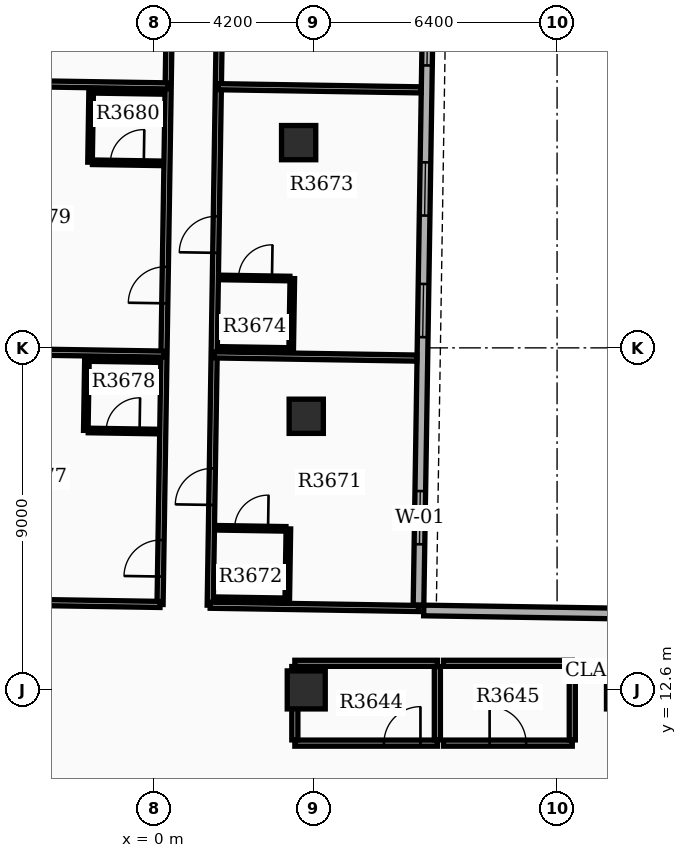
"""IFC4 building model, lengths in metres.
Left out: names, types, materials, properties, quantities, classifications, styles, units other than length and angle.
Written with IfcOpenShell. Run it as: python <this file> out.ifc"""

import sys

from ifc_helpers import new_model, si_unit, direction, frame, frame_2d, origin, origin_2d, place, context, subcontext, project, spatial, rectangle, extrude, element, fill, save


model = new_model("IFC4")
c1 = context("Model", 3, precision=1e-05, world=origin(), true_north=direction((0.0, 1.0)))
c2 = subcontext(c1, "Body", "Model", "MODEL_VIEW")
j1 = project(units=[si_unit("LENGTHUNIT", "METRE"), si_unit("PLANEANGLEUNIT", "RADIAN")], contexts=[c1])
p1 = place(None, origin())
s1 = spatial("IfcSite", under=j1, at=p1, CompositionType="ELEMENT")
p2 = place(p1, origin())
s2 = spatial("IfcBuilding", under=s1, at=p2, CompositionType="ELEMENT")
p3 = place(p2, frame((0.0, 0.0, 228.6)))
s3 = spatial("IfcBuildingStorey", under=s2, at=p3, CompositionType="ELEMENT", Elevation=228.6)
for number, where, z_axis, x_axis in (
    (1, (12.4, 12.6, 0.0), (0.0, 0.0, 1.0), (1.0, 0.0, 0.0)),
    (2, (4.0, 12.6, 0.0), (0.0, 0.0, 1.0), (1.0, 0.0, 0.0)),
):
    element("IfcColumn", number, at=place(p3, frame(where, z_axis=z_axis, x_axis=x_axis)), inside=s3, PredefinedType="COLUMN", context=c2, shape_type="SweptSolid", body=[
        extrude(rectangle(XDim=1.0, YDim=1.0, at=origin_2d()), origin(), (0.0, 0.0, 1.0), 3.9),
    ])
for number, where, z_axis, x_axis in (
    (3, (4.0, 19.8, 0.0), (0.0, 0.0, 1.0), (1.0, 0.0, 0.0)),
    (4, (3.8, 27.0, 0.0), (0.0, 0.0, 1.0), (1.0, 0.0, 0.0)),
):
    element("IfcColumn", number, at=place(p3, frame(where, z_axis=z_axis, x_axis=x_axis)), inside=s3, PredefinedType="COLUMN", context=c2, shape_type="SweptSolid", body=[
        extrude(rectangle(XDim=0.9, YDim=0.9, at=origin_2d()), origin(), (0.0, 0.0, 1.0), 3.9),
    ])
p4 = place(p3, frame((6.954, 14.833, 0.0), z_axis=(0.0, 0.0, 1.0), x_axis=(0.015705059908, 0.999876667941, 0.0)))
e5 = element("IfcWall", 5, at=p4, inside=s3, PredefinedType="STANDARD", context=c2, shape_type="SweptSolid", body=[
    extrude(rectangle(XDim=20.1, YDim=0.28, at=frame_2d((10.05, 0.0))), origin(), (0.0, 0.0, 1.0), 3.18),
])
p5 = place(p4, frame((1.6, 0.0, 0.8)))
e6 = element("IfcOpeningElement", 6, at=p5, cuts=e5, PredefinedType="OPENING", context=c2, shape_type="SweptSolid", body=[
    extrude(rectangle(XDim=1.4, YDim=1.6, at=frame_2d((0.7, 0.8))), frame((0.0, 0.15, 0.0), z_axis=(0.0, -1.0, 0.0), x_axis=(1.0, 0.0, 0.0)), (0.0, 0.0, 1.0), 0.3),
])
p6 = place(p4, frame((7.05, 0.0, 0.8)))
e7 = element("IfcOpeningElement", 7, at=p6, cuts=e5, PredefinedType="OPENING", context=c2, shape_type="SweptSolid", body=[
    extrude(rectangle(XDim=1.4, YDim=1.6, at=frame_2d((0.7, 0.8))), frame((0.0, 0.15, 0.0), z_axis=(0.0, -1.0, 0.0), x_axis=(1.0, 0.0, 0.0)), (0.0, 0.0, 1.0), 0.3),
])
p7 = place(p4, frame((10.25, 0.0, 0.8)))
e8 = element("IfcOpeningElement", 8, at=p7, cuts=e5, PredefinedType="OPENING", context=c2, shape_type="SweptSolid", body=[
    extrude(rectangle(XDim=1.4, YDim=1.6, at=frame_2d((0.7, 0.8))), frame((0.0, 0.15, 0.0), z_axis=(0.0, -1.0, 0.0), x_axis=(1.0, 0.0, 0.0)), (0.0, 0.0, 1.0), 0.3),
])
p8 = place(p4, frame((14.2, 0.0, 0.8)))
e9 = element("IfcOpeningElement", 9, at=p8, cuts=e5, PredefinedType="OPENING", context=c2, shape_type="SweptSolid", body=[
    extrude(rectangle(XDim=1.4, YDim=1.6, at=frame_2d((0.7, 0.8))), frame((0.0, 0.15, 0.0), z_axis=(0.0, -1.0, 0.0), x_axis=(1.0, 0.0, 0.0)), (0.0, 0.0, 1.0), 0.3),
])
p9 = place(p3, frame((13.391, 14.592, 0.0), z_axis=(0.0, 0.0, 1.0), x_axis=(-0.999876833368, 0.015694524359, 0.0)))
e10 = element("IfcWall", 10, at=p9, inside=s3, PredefinedType="STANDARD", context=c2, shape_type="SweptSolid", body=[
    extrude(rectangle(XDim=6.3, YDim=0.28, at=frame_2d((3.15, 0.0))), origin(), (0.0, 0.0, 1.0), 3.18),
])
p10 = place(p3, frame((3.7, 11.2, 0.0), z_axis=(0.0, 0.0, 1.0), x_axis=(1.0, 0.0, 0.0)))
e11 = element("IfcWall", 11, at=p10, inside=s3, PredefinedType="PARTITIONING", context=c2, shape_type="SweptSolid", body=[
    extrude(rectangle(XDim=3.75, YDim=0.16, at=frame_2d((1.875, 0.0))), origin(), (0.0, 0.0, 1.0), 3.17),
])
p11 = place(p10, frame((2.345, 0.0, 0.0)))
e12 = element("IfcOpeningElement", 12, at=p11, cuts=e11, PredefinedType="OPENING", context=c2, shape_type="SweptSolid", body=[
    extrude(rectangle(XDim=0.96, YDim=2.15, at=frame_2d((0.48, 1.075))), frame((0.0, 0.09, 0.0), z_axis=(0.0, -1.0, 0.0), x_axis=(1.0, 0.0, 0.0)), (0.0, 0.0, 1.0), 0.18),
])
p12 = place(p3, frame((3.7, 13.3, 0.0), z_axis=(0.0, 0.0, 1.0), x_axis=(1.0, 0.0, 0.0)))
e13 = element("IfcWall", 13, at=p12, inside=s3, PredefinedType="PARTITIONING", context=c2, shape_type="SweptSolid", body=[
    extrude(rectangle(XDim=3.75, YDim=0.16, at=frame_2d((1.875, 0.0))), origin(), (0.0, 0.0, 1.0), 3.17),
])
for number, where, z_axis, x_axis in (
    (14, (3.7, 11.285, 0.0), (0.0, 0.0, 1.0), (0.0, 1.0, 0.0)),
    (15, (7.45, 11.285, 0.0), (0.0, 0.0, 1.0), (0.0, 1.0, 0.0)),
):
    element("IfcWall", number, at=place(p3, frame(where, z_axis=z_axis, x_axis=x_axis)), inside=s3, PredefinedType="PARTITIONING", context=c2, shape_type="SweptSolid", body=[
        extrude(rectangle(XDim=1.93, YDim=0.16, at=frame_2d((0.965, 0.0))), origin(), (0.0, 0.0, 1.0), 3.17),
    ])
p13 = place(p3, frame((7.61, 11.2, 0.0), z_axis=(0.0, 0.0, 1.0), x_axis=(1.0, 0.0, 0.0)))
e16 = element("IfcWall", 16, at=p13, inside=s3, PredefinedType="PARTITIONING", context=c2, shape_type="SweptSolid", body=[
    extrude(rectangle(XDim=3.39, YDim=0.16, at=frame_2d((1.695, 0.0))), origin(), (0.0, 0.0, 1.0), 3.17),
])
p14 = place(p13, frame((1.215, 0.0, 0.0)))
e17 = element("IfcOpeningElement", 17, at=p14, cuts=e16, PredefinedType="OPENING", context=c2, shape_type="SweptSolid", body=[
    extrude(rectangle(XDim=0.96, YDim=2.15, at=frame_2d((0.48, 1.075))), frame((0.0, 0.09, 0.0), z_axis=(0.0, -1.0, 0.0), x_axis=(1.0, 0.0, 0.0)), (0.0, 0.0, 1.0), 0.18),
])
p15 = place(p3, frame((7.61, 13.3, 0.0), z_axis=(0.0, 0.0, 1.0), x_axis=(1.0, 0.0, 0.0)))
e18 = element("IfcWall", 18, at=p15, inside=s3, PredefinedType="PARTITIONING", context=c2, shape_type="SweptSolid", body=[
    extrude(rectangle(XDim=3.39, YDim=0.16, at=frame_2d((1.695, 0.0))), origin(), (0.0, 0.0, 1.0), 3.17),
])
p16 = place(p3, frame((11.0, 11.285, 0.0), z_axis=(0.0, 0.0, 1.0), x_axis=(0.0, 1.0, 0.0)))
e19 = element("IfcWall", 19, at=p16, inside=s3, PredefinedType="PARTITIONING", context=c2, shape_type="SweptSolid", body=[
    extrude(rectangle(XDim=1.93, YDim=0.16, at=frame_2d((0.965, 0.0))), origin(), (0.0, 0.0, 1.0), 3.17),
])
p17 = place(p3, frame((1.473, 14.829, 0.0), z_axis=(0.0, 0.0, 1.0), x_axis=(0.015701703245, 0.999876720659, 0.0)))
e20 = element("IfcWall", 20, at=p17, inside=s3, PredefinedType="PARTITIONING", context=c2, shape_type="SweptSolid", body=[
    extrude(rectangle(XDim=20.182, YDim=0.16, at=frame_2d((10.091, 0.0))), origin(), (0.0, 0.0, 1.0), 3.17),
])
p18 = place(p17, frame((2.639, 0.0, 0.0)))
e21 = element("IfcOpeningElement", 21, at=p18, cuts=e20, PredefinedType="OPENING", context=c2, shape_type="SweptSolid", body=[
    extrude(rectangle(XDim=0.96, YDim=2.15, at=frame_2d((0.48, 1.075))), frame((0.0, 0.09, 0.0), z_axis=(0.0, -1.0, 0.0), x_axis=(1.0, 0.0, 0.0)), (0.0, 0.0, 1.0), 0.18),
])
p19 = place(p17, frame((9.273, 0.0, 0.0)))
e22 = element("IfcOpeningElement", 22, at=p19, cuts=e20, PredefinedType="OPENING", context=c2, shape_type="SweptSolid", body=[
    extrude(rectangle(XDim=0.96, YDim=2.15, at=frame_2d((0.48, 1.075))), frame((0.0, 0.09, 0.0), z_axis=(0.0, -1.0, 0.0), x_axis=(1.0, 0.0, 0.0)), (0.0, 0.0, 1.0), 0.18),
])
p20 = place(p17, frame((16.614, 0.0, 0.0)))
e23 = element("IfcOpeningElement", 23, at=p20, cuts=e20, PredefinedType="OPENING", context=c2, shape_type="SweptSolid", body=[
    extrude(rectangle(XDim=0.96, YDim=2.15, at=frame_2d((0.48, 1.075))), frame((0.0, 0.09, 0.0), z_axis=(0.0, -1.0, 0.0), x_axis=(1.0, 0.0, 0.0)), (0.0, 0.0, 1.0), 0.18),
])
p21 = place(p3, frame((1.473, 14.829, 0.0), z_axis=(0.0, 0.0, 1.0), x_axis=(0.999877025973, -0.015682248948, 0.0)))
e24 = element("IfcWall", 24, at=p21, inside=s3, PredefinedType="PARTITIONING", context=c2, shape_type="SweptSolid", body=[
    extrude(rectangle(XDim=5.48, YDim=0.16, at=frame_2d((2.74, 0.0))), origin(), (0.0, 0.0, 1.0), 3.17),
])
p22 = place(p3, frame((1.577, 21.415, 0.0), z_axis=(0.0, 0.0, 1.0), x_axis=(0.999876663408, -0.015705348516, 0.0)))
e25 = element("IfcWall", 25, at=p22, inside=s3, PredefinedType="PARTITIONING", context=c2, shape_type="SweptSolid", body=[
    extrude(rectangle(XDim=5.332, YDim=0.16, at=frame_2d((2.666, 0.0))), origin(), (0.0, 0.0, 1.0), 3.17),
])
p23 = place(p3, frame((1.645, 16.866, 0.0), z_axis=(0.0, 0.0, 1.0), x_axis=(0.999876836305, -0.015694337248, 0.0)))
e26 = element("IfcWall", 26, at=p23, inside=s3, PredefinedType="PARTITIONING", context=c2, shape_type="SweptSolid", body=[
    extrude(rectangle(XDim=1.82, YDim=0.12, at=frame_2d((0.91, 0.0))), origin(), (0.0, 0.0, 1.0), 3.17),
])
p24 = place(p23, frame((0.47, 0.0, 0.0)))
e27 = element("IfcOpeningElement", 27, at=p24, cuts=e26, PredefinedType="OPENING", context=c2, shape_type="SweptSolid", body=[
    extrude(rectangle(XDim=0.88, YDim=2.1, at=frame_2d((0.44, 1.05))), frame((0.0, 0.07, 0.0), z_axis=(0.0, -1.0, 0.0), x_axis=(1.0, 0.0, 0.0)), (0.0, 0.0, 1.0), 0.14),
])
p25 = place(p3, frame((1.615, 14.987, 0.0), z_axis=(0.0, 0.0, 1.0), x_axis=(0.999876836305, -0.015694337248, 0.0)))
e28 = element("IfcWall", 28, at=p25, inside=s3, PredefinedType="PARTITIONING", context=c2, shape_type="SweptSolid", body=[
    extrude(rectangle(XDim=1.82, YDim=0.12, at=frame_2d((0.91, 0.0))), origin(), (0.0, 0.0, 1.0), 3.17),
])
p26 = place(p3, frame((3.5, 14.957, 0.0), z_axis=(0.0, 0.0, 1.0), x_axis=(0.015582523404, 0.999878585111, 0.0)))
e29 = element("IfcWall", 29, at=p26, inside=s3, PredefinedType="PARTITIONING", context=c2, shape_type="SweptSolid", body=[
    extrude(rectangle(XDim=1.88, YDim=0.12, at=frame_2d((0.94, 0.0))), origin(), (0.0, 0.0, 1.0), 3.17),
])
p27 = place(p3, frame((1.688, 28.472, 0.0), z_axis=(0.0, 0.0, 1.0), x_axis=(0.999876663408, -0.015705348516, 0.0)))
e30 = element("IfcWall", 30, at=p27, inside=s3, PredefinedType="PARTITIONING", context=c2, shape_type="SweptSolid", body=[
    extrude(rectangle(XDim=5.332, YDim=0.16, at=frame_2d((2.666, 0.0))), origin(), (0.0, 0.0, 1.0), 3.17),
])
p28 = place(p3, frame((1.749, 23.452, 0.0), z_axis=(0.0, 0.0, 1.0), x_axis=(0.999876836305, -0.015694337248, 0.0)))
e31 = element("IfcWall", 31, at=p28, inside=s3, PredefinedType="PARTITIONING", context=c2, shape_type="SweptSolid", body=[
    extrude(rectangle(XDim=1.82, YDim=0.12, at=frame_2d((0.91, 0.0))), origin(), (0.0, 0.0, 1.0), 3.17),
])
p29 = place(p28, frame((0.47, 0.0, 0.0)))
e32 = element("IfcOpeningElement", 32, at=p29, cuts=e31, PredefinedType="OPENING", context=c2, shape_type="SweptSolid", body=[
    extrude(rectangle(XDim=0.88, YDim=2.1, at=frame_2d((0.44, 1.05))), frame((0.0, 0.07, 0.0), z_axis=(0.0, -1.0, 0.0), x_axis=(1.0, 0.0, 0.0)), (0.0, 0.0, 1.0), 0.14),
])
p30 = place(p3, frame((1.719, 21.573, 0.0), z_axis=(0.0, 0.0, 1.0), x_axis=(0.999876836305, -0.015694337248, 0.0)))
e33 = element("IfcWall", 33, at=p30, inside=s3, PredefinedType="PARTITIONING", context=c2, shape_type="SweptSolid", body=[
    extrude(rectangle(XDim=1.82, YDim=0.12, at=frame_2d((0.91, 0.0))), origin(), (0.0, 0.0, 1.0), 3.17),
])
p31 = place(p3, frame((3.604, 21.543, 0.0), z_axis=(0.0, 0.0, 1.0), x_axis=(0.015714386166, 0.99987652141, 0.0)))
e34 = element("IfcWall", 34, at=p31, inside=s3, PredefinedType="PARTITIONING", context=c2, shape_type="SweptSolid", body=[
    extrude(rectangle(XDim=1.88, YDim=0.12, at=frame_2d((0.94, 0.0))), origin(), (0.0, 0.0, 1.0), 3.17),
])
p32 = place(p3, frame((0.153, 14.849, 0.0), z_axis=(0.0, 0.0, 1.0), x_axis=(0.015701893165, 0.999876717676, 0.0)))
e35 = element("IfcWall", 35, at=p32, inside=s3, PredefinedType="PARTITIONING", context=c2, shape_type="SweptSolid", body=[
    extrude(rectangle(XDim=20.182, YDim=0.16, at=frame_2d((10.091, 0.0))), origin(), (0.0, 0.0, 1.0), 3.17),
])
p33 = place(p32, frame((0.734, 0.0, 0.0)))
e36 = element("IfcOpeningElement", 36, at=p33, cuts=e35, PredefinedType="OPENING", context=c2, shape_type="SweptSolid", body=[
    extrude(rectangle(XDim=0.96, YDim=2.15, at=frame_2d((0.48, 1.075))), frame((0.0, 0.09, 0.0), z_axis=(0.0, -1.0, 0.0), x_axis=(1.0, 0.0, 0.0)), (0.0, 0.0, 1.0), 0.18),
])
p34 = place(p32, frame((7.924, 0.0, 0.0)))
e37 = element("IfcOpeningElement", 37, at=p34, cuts=e35, PredefinedType="OPENING", context=c2, shape_type="SweptSolid", body=[
    extrude(rectangle(XDim=0.96, YDim=2.15, at=frame_2d((0.48, 1.075))), frame((0.0, 0.09, 0.0), z_axis=(0.0, -1.0, 0.0), x_axis=(1.0, 0.0, 0.0)), (0.0, 0.0, 1.0), 0.18),
])
p35 = place(p32, frame((16.614, 0.0, 0.0)))
e38 = element("IfcOpeningElement", 38, at=p35, cuts=e35, PredefinedType="OPENING", context=c2, shape_type="SweptSolid", body=[
    extrude(rectangle(XDim=0.96, YDim=2.15, at=frame_2d((0.48, 1.075))), frame((0.0, 0.09, 0.0), z_axis=(0.0, -1.0, 0.0), x_axis=(1.0, 0.0, 0.0)), (0.0, 0.0, 1.0), 0.18),
])
p36 = place(p3, frame((0.153, 14.849, 0.0), z_axis=(0.0, 0.0, 1.0), x_axis=(-0.999876746497, 0.015700057761, 0.0)))
e39 = element("IfcWall", 39, at=p36, inside=s3, PredefinedType="PARTITIONING", context=c2, shape_type="SweptSolid", body=[
    extrude(rectangle(XDim=6.64, YDim=0.16, at=frame_2d((3.32, 0.0))), origin(), (0.0, 0.0, 1.0), 3.17),
])
p37 = place(p3, frame((0.257, 21.436, 0.0), z_axis=(0.0, 0.0, 1.0), x_axis=(-0.999876442039, 0.015719435564, 0.0)))
e40 = element("IfcWall", 40, at=p37, inside=s3, PredefinedType="PARTITIONING", context=c2, shape_type="SweptSolid", body=[
    extrude(rectangle(XDim=6.492, YDim=0.16, at=frame_2d((3.246, 0.0))), origin(), (0.0, 0.0, 1.0), 3.17),
])
p38 = place(p3, frame((-1.735, 19.427, 0.0), z_axis=(0.0, 0.0, 1.0), x_axis=(0.999878932289, -0.015560230231, 0.0)))
e41 = element("IfcWall", 41, at=p38, inside=s3, PredefinedType="PARTITIONING", context=c2, shape_type="SweptSolid", body=[
    extrude(rectangle(XDim=1.82, YDim=0.12, at=frame_2d((0.91, 0.0))), origin(), (0.0, 0.0, 1.0), 3.17),
])
p39 = place(p38, frame((0.47, 0.0, 0.0)))
e42 = element("IfcOpeningElement", 42, at=p39, cuts=e41, PredefinedType="OPENING", context=c2, shape_type="SweptSolid", body=[
    extrude(rectangle(XDim=0.88, YDim=2.1, at=frame_2d((0.44, 1.05))), frame((0.0, 0.07, 0.0), z_axis=(0.0, -1.0, 0.0), x_axis=(1.0, 0.0, 0.0)), (0.0, 0.0, 1.0), 0.14),
])
p40 = place(p3, frame((-1.706, 21.306, 0.0), z_axis=(0.0, 0.0, 1.0), x_axis=(0.999876836305, -0.015694337248, 0.0)))
e43 = element("IfcWall", 43, at=p40, inside=s3, PredefinedType="PARTITIONING", context=c2, shape_type="SweptSolid", body=[
    extrude(rectangle(XDim=1.82, YDim=0.12, at=frame_2d((0.91, 0.0))), origin(), (0.0, 0.0, 1.0), 3.17),
])
p41 = place(p3, frame((-1.8, 19.428, 0.0), z_axis=(0.0, 0.0, 1.0), x_axis=(0.015714386166, 0.99987652141, 0.0)))
e44 = element("IfcWall", 44, at=p41, inside=s3, PredefinedType="PARTITIONING", context=c2, shape_type="SweptSolid", body=[
    extrude(rectangle(XDim=1.88, YDim=0.12, at=frame_2d((0.94, 0.0))), origin(), (0.0, 0.0, 1.0), 3.17),
])
p42 = place(p3, frame((0.368, 28.493, 0.0), z_axis=(0.0, 0.0, 1.0), x_axis=(-0.999876442039, 0.015719435564, 0.0)))
e45 = element("IfcWall", 45, at=p42, inside=s3, PredefinedType="PARTITIONING", context=c2, shape_type="SweptSolid", body=[
    extrude(rectangle(XDim=6.492, YDim=0.16, at=frame_2d((3.246, 0.0))), origin(), (0.0, 0.0, 1.0), 3.17),
])
p43 = place(p3, frame((-1.624, 26.484, 0.0), z_axis=(0.0, 0.0, 1.0), x_axis=(0.999874722342, -0.015828443418, 0.0)))
e46 = element("IfcWall", 46, at=p43, inside=s3, PredefinedType="PARTITIONING", context=c2, shape_type="SweptSolid", body=[
    extrude(rectangle(XDim=1.82, YDim=0.12, at=frame_2d((0.91, 0.0))), origin(), (0.0, 0.0, 1.0), 3.17),
])
p44 = place(p43, frame((0.47, 0.0, 0.0)))
e47 = element("IfcOpeningElement", 47, at=p44, cuts=e46, PredefinedType="OPENING", context=c2, shape_type="SweptSolid", body=[
    extrude(rectangle(XDim=0.88, YDim=2.1, at=frame_2d((0.44, 1.05))), frame((0.0, 0.07, 0.0), z_axis=(0.0, -1.0, 0.0), x_axis=(1.0, 0.0, 0.0)), (0.0, 0.0, 1.0), 0.14),
])
p45 = place(p3, frame((-1.595, 28.364, 0.0), z_axis=(0.0, 0.0, 1.0), x_axis=(0.999876836305, -0.015694337248, 0.0)))
e48 = element("IfcWall", 48, at=p45, inside=s3, PredefinedType="PARTITIONING", context=c2, shape_type="SweptSolid", body=[
    extrude(rectangle(XDim=1.82, YDim=0.12, at=frame_2d((0.91, 0.0))), origin(), (0.0, 0.0, 1.0), 3.17),
])
p46 = place(p3, frame((-1.689, 26.485, 0.0), z_axis=(0.0, 0.0, 1.0), x_axis=(0.015714386166, 0.99987652141, 0.0)))
e49 = element("IfcWall", 49, at=p46, inside=s3, PredefinedType="PARTITIONING", context=c2, shape_type="SweptSolid", body=[
    extrude(rectangle(XDim=1.88, YDim=0.12, at=frame_2d((0.94, 0.0))), origin(), (0.0, 0.0, 1.0), 3.17),
])
p47 = place(p5, origin())
e50 = element("IfcWindow", 50, at=p47, inside=s3, PartitioningType="SINGLE_PANEL", PredefinedType="WINDOW", context=c2, shape_type="SweptSolid", body=[
    extrude(rectangle(XDim=1.4, YDim=1.6, at=frame_2d((0.7, 0.8))), frame((0.0, 0.03, 0.0), z_axis=(0.0, -1.0, 0.0), x_axis=(1.0, 0.0, 0.0)), (0.0, 0.0, 1.0), 0.06),
])
fill(e6, e50)
p48 = place(p6, origin())
e51 = element("IfcWindow", 51, at=p48, inside=s3, PartitioningType="SINGLE_PANEL", PredefinedType="WINDOW", context=c2, shape_type="SweptSolid", body=[
    extrude(rectangle(XDim=1.4, YDim=1.6, at=frame_2d((0.7, 0.8))), frame((0.0, 0.03, 0.0), z_axis=(0.0, -1.0, 0.0), x_axis=(1.0, 0.0, 0.0)), (0.0, 0.0, 1.0), 0.06),
])
fill(e7, e51)
p49 = place(p7, origin())
e52 = element("IfcWindow", 52, at=p49, inside=s3, PartitioningType="SINGLE_PANEL", PredefinedType="WINDOW", context=c2, shape_type="SweptSolid", body=[
    extrude(rectangle(XDim=1.4, YDim=1.6, at=frame_2d((0.7, 0.8))), frame((0.0, 0.03, 0.0), z_axis=(0.0, -1.0, 0.0), x_axis=(1.0, 0.0, 0.0)), (0.0, 0.0, 1.0), 0.06),
])
fill(e8, e52)
p50 = place(p8, origin())
e53 = element("IfcWindow", 53, at=p50, inside=s3, PartitioningType="SINGLE_PANEL", PredefinedType="WINDOW", context=c2, shape_type="SweptSolid", body=[
    extrude(rectangle(XDim=1.4, YDim=1.6, at=frame_2d((0.7, 0.8))), frame((0.0, 0.03, 0.0), z_axis=(0.0, -1.0, 0.0), x_axis=(1.0, 0.0, 0.0)), (0.0, 0.0, 1.0), 0.06),
])
fill(e9, e53)
p51 = place(p11, origin())
e54 = element("IfcDoor", 54, at=p51, inside=s3, OperationType="SINGLE_SWING_RIGHT", PredefinedType="DOOR", context=c2, shape_type="SweptSolid", body=[
    extrude(rectangle(XDim=0.96, YDim=2.15, at=frame_2d((0.48, 1.075))), frame((0.0, 0.025, 0.0), z_axis=(0.0, -1.0, 0.0), x_axis=(1.0, 0.0, 0.0)), (0.0, 0.0, 1.0), 0.05),
])
fill(e12, e54)
p52 = place(p14, origin())
e55 = element("IfcDoor", 55, at=p52, inside=s3, OperationType="SINGLE_SWING_LEFT", PredefinedType="DOOR", context=c2, shape_type="SweptSolid", body=[
    extrude(rectangle(XDim=0.96, YDim=2.15, at=frame_2d((0.48, 1.075))), frame((0.0, 0.025, 0.0), z_axis=(0.0, -1.0, 0.0), x_axis=(1.0, 0.0, 0.0)), (0.0, 0.0, 1.0), 0.05),
])
fill(e17, e55)
p53 = place(p18, origin())
e56 = element("IfcDoor", 56, at=p53, inside=s3, OperationType="SINGLE_SWING_LEFT", PredefinedType="DOOR", context=c2, shape_type="SweptSolid", body=[
    extrude(rectangle(XDim=0.96, YDim=2.15, at=frame_2d((0.48, 1.075))), frame((0.0, 0.025, 0.0), z_axis=(0.0, -1.0, 0.0), x_axis=(1.0, 0.0, 0.0)), (0.0, 0.0, 1.0), 0.05),
])
fill(e21, e56)
p54 = place(p24, origin())
e57 = element("IfcDoor", 57, at=p54, inside=s3, OperationType="SINGLE_SWING_RIGHT", PredefinedType="DOOR", context=c2, shape_type="SweptSolid", body=[
    extrude(rectangle(XDim=0.88, YDim=2.1, at=frame_2d((0.44, 1.05))), frame((0.0, 0.025, 0.0), z_axis=(0.0, -1.0, 0.0), x_axis=(1.0, 0.0, 0.0)), (0.0, 0.0, 1.0), 0.05),
])
fill(e27, e57)
p55 = place(p19, origin())
e58 = element("IfcDoor", 58, at=p55, inside=s3, OperationType="SINGLE_SWING_LEFT", PredefinedType="DOOR", context=c2, shape_type="SweptSolid", body=[
    extrude(rectangle(XDim=0.96, YDim=2.15, at=frame_2d((0.48, 1.075))), frame((0.0, 0.025, 0.0), z_axis=(0.0, -1.0, 0.0), x_axis=(1.0, 0.0, 0.0)), (0.0, 0.0, 1.0), 0.05),
])
fill(e22, e58)
p56 = place(p29, origin())
e59 = element("IfcDoor", 59, at=p56, inside=s3, OperationType="SINGLE_SWING_RIGHT", PredefinedType="DOOR", context=c2, shape_type="SweptSolid", body=[
    extrude(rectangle(XDim=0.88, YDim=2.1, at=frame_2d((0.44, 1.05))), frame((0.0, 0.025, 0.0), z_axis=(0.0, -1.0, 0.0), x_axis=(1.0, 0.0, 0.0)), (0.0, 0.0, 1.0), 0.05),
])
fill(e32, e59)
p57 = place(p33, origin())
e60 = element("IfcDoor", 60, at=p57, inside=s3, OperationType="SINGLE_SWING_LEFT", PredefinedType="DOOR", context=c2, shape_type="SweptSolid", body=[
    extrude(rectangle(XDim=0.96, YDim=2.15, at=frame_2d((0.48, 1.075))), frame((0.0, 0.025, 0.0), z_axis=(0.0, -1.0, 0.0), x_axis=(1.0, 0.0, 0.0)), (0.0, 0.0, 1.0), 0.05),
])
fill(e36, e60)
p58 = place(p39, origin())
e61 = element("IfcDoor", 61, at=p58, inside=s3, OperationType="SINGLE_SWING_RIGHT", PredefinedType="DOOR", context=c2, shape_type="SweptSolid", body=[
    extrude(rectangle(XDim=0.88, YDim=2.1, at=frame_2d((0.44, 1.05))), frame((0.0, 0.025, 0.0), z_axis=(0.0, -1.0, 0.0), x_axis=(1.0, 0.0, 0.0)), (0.0, 0.0, 1.0), 0.05),
])
fill(e42, e61)
p59 = place(p34, origin())
e62 = element("IfcDoor", 62, at=p59, inside=s3, OperationType="SINGLE_SWING_LEFT", PredefinedType="DOOR", context=c2, shape_type="SweptSolid", body=[
    extrude(rectangle(XDim=0.96, YDim=2.15, at=frame_2d((0.48, 1.075))), frame((0.0, 0.025, 0.0), z_axis=(0.0, -1.0, 0.0), x_axis=(1.0, 0.0, 0.0)), (0.0, 0.0, 1.0), 0.05),
])
fill(e37, e62)
p60 = place(p44, origin())
e63 = element("IfcDoor", 63, at=p60, inside=s3, OperationType="SINGLE_SWING_RIGHT", PredefinedType="DOOR", context=c2, shape_type="SweptSolid", body=[
    extrude(rectangle(XDim=0.88, YDim=2.1, at=frame_2d((0.44, 1.05))), frame((0.0, 0.025, 0.0), z_axis=(0.0, -1.0, 0.0), x_axis=(1.0, 0.0, 0.0)), (0.0, 0.0, 1.0), 0.05),
])
fill(e47, e63)
save(model, sys.argv[1])
